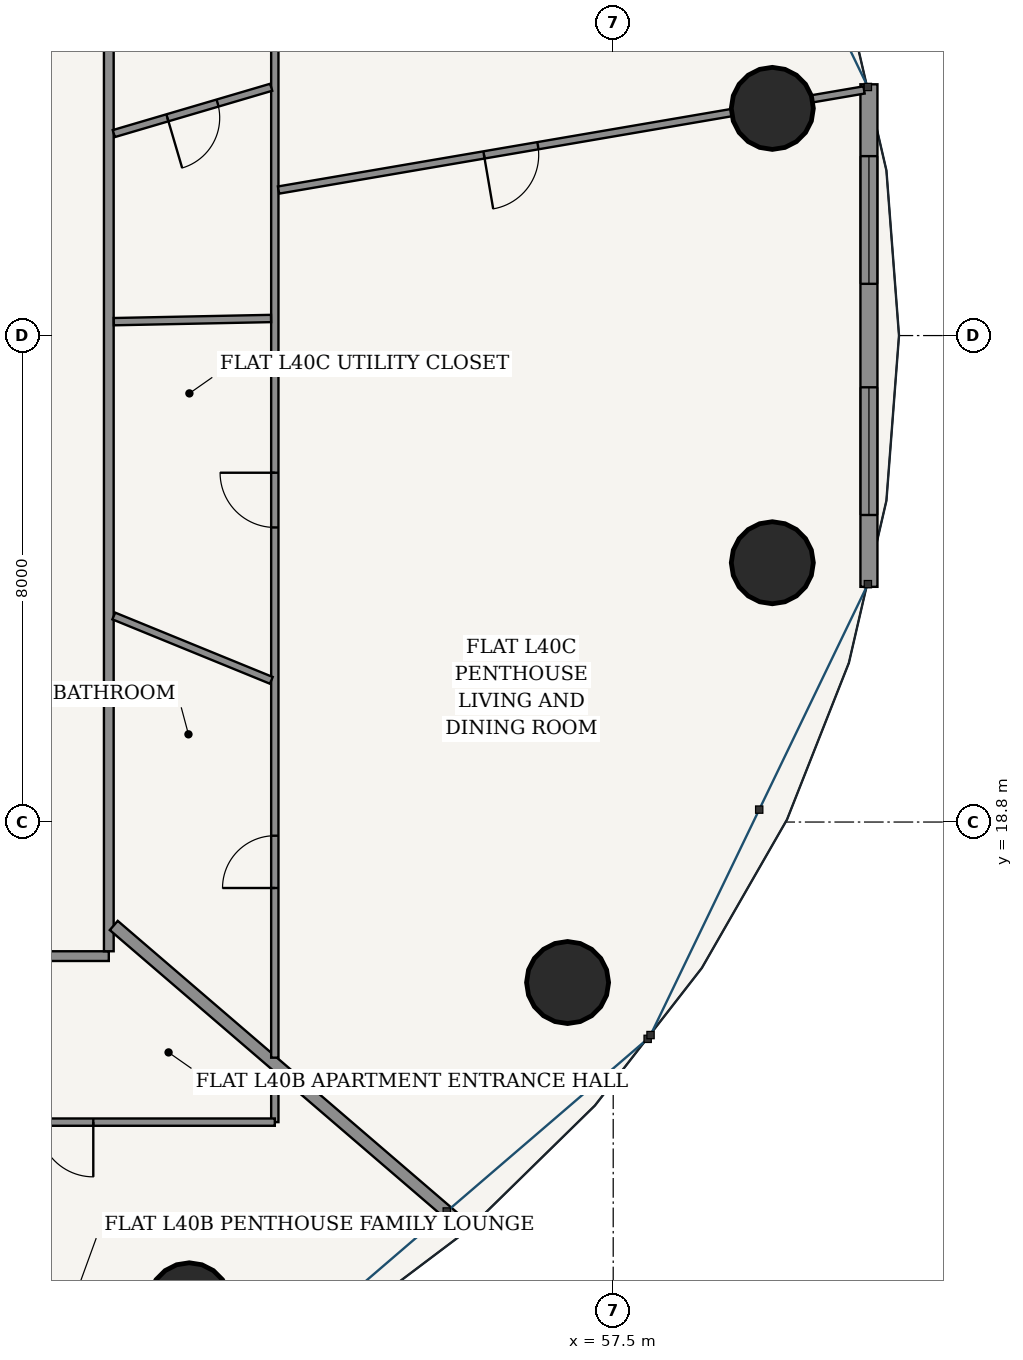
"""IFC4 building model, lengths in metres.
Left out: names, types, materials, properties, quantities, classifications, styles, units other than length and angle.
Written with IfcOpenShell. Run it as: python <this file> out.ifc"""

import sys

from ifc_helpers import new_model, si_unit, direction, frame, frame_2d, origin, origin_2d, place, context, subcontext, project, spatial, rectangle, hollow_circle, extrude, source, transform, mapped, element, fill, save


model = new_model("IFC4")
c1 = context("Model", 3, precision=1e-05, world=origin(), true_north=direction((-0.2419218956, 0.970295726276)))
c2 = subcontext(c1, "Body", "Model", "MODEL_VIEW")
j1 = project(units=[si_unit("LENGTHUNIT", "METRE"), si_unit("PLANEANGLEUNIT", "RADIAN")], contexts=[c1])
p1 = place(None, origin())
s1 = spatial("IfcSite", under=j1, at=p1, CompositionType="ELEMENT")
p2 = place(p1, origin())
s2 = spatial("IfcBuilding", under=s1, at=p2, CompositionType="ELEMENT")
p3 = place(p2, frame((0.0, 0.0, 153.4)))
s3 = spatial("IfcBuildingStorey", under=s2, at=p3, CompositionType="ELEMENT", Elevation=153.4)
for number, where, z_axis, x_axis in (
    (1, (60.117, 30.536, 0.0), (0.0, 0.0, 1.0), (1.0, 0.0, 0.0)),
    (2, (50.528, 10.877, 0.0), (0.0, 0.0, 1.0), (1.0, 0.0, 0.0)),
    (3, (56.75, 16.161, 0.0), (0.0, 0.0, 1.0), (1.0, 0.0, 0.0)),
    (4, (60.117, 23.064, 0.0), (0.0, 0.0, 1.0), (1.0, 0.0, 0.0)),
):
    element("IfcColumn", number, at=place(p3, frame(where, z_axis=z_axis, x_axis=x_axis)), inside=s3, PredefinedType="COLUMN", context=c2, shape_type="SweptSolid", body=[
        extrude(hollow_circle(Radius=0.675, WallThickness=0.042, at=origin_2d()), origin(), (0.0, 0.0, 1.0), 3.6),
    ])
p4 = place(p3, frame((61.706, 22.668, 0.0), z_axis=(0.0, 0.0, 1.0), x_axis=(0.0, 1.0, 0.0)))
e5 = element("IfcWall", 5, at=p4, inside=s3, PredefinedType="SOLIDWALL", context=c2, shape_type="SweptSolid", body=[
    extrude(rectangle(XDim=8.264, YDim=0.28, at=frame_2d((4.132, 0.0))), origin(), (0.0, 0.0, 1.0), 3.33),
])
p5 = place(p4, frame((1.181, 0.0, 0.85)))
e6 = element("IfcOpeningElement", 6, at=p5, cuts=e5, PredefinedType="OPENING", context=c2, shape_type="SweptSolid", body=[
    extrude(rectangle(XDim=2.1, YDim=1.95, at=frame_2d((1.05, 0.975))), frame((0.0, 0.15, 0.0), z_axis=(0.0, -1.0, 0.0), x_axis=(1.0, 0.0, 0.0)), (0.0, 0.0, 1.0), 0.3),
])
p6 = place(p4, frame((4.983, 0.0, 0.85)))
e7 = element("IfcOpeningElement", 7, at=p6, cuts=e5, PredefinedType="OPENING", context=c2, shape_type="SweptSolid", body=[
    extrude(rectangle(XDim=2.1, YDim=1.95, at=frame_2d((1.05, 0.975))), frame((0.0, 0.15, 0.0), z_axis=(0.0, -1.0, 0.0), x_axis=(1.0, 0.0, 0.0)), (0.0, 0.0, 1.0), 0.3),
])
p7 = place(p3, frame((34.32, 16.595, 0.0), z_axis=(0.0, 0.0, 1.0), x_axis=(1.0, 0.0, 0.0)))
e8 = element("IfcWall", 8, at=p7, inside=s3, PredefinedType="PARTITIONING", context=c2, shape_type="SweptSolid", body=[
    extrude(rectangle(XDim=14.885, YDim=0.16, at=frame_2d((7.442, 0.0))), origin(), (0.0, 0.0, 1.0), 2.776),
])
p8 = place(p7, frame((11.609, 0.0, 0.0)))
e9 = element("IfcOpeningElement", 9, at=p8, cuts=e8, PredefinedType="OPENING", context=c2, shape_type="SweptSolid", body=[
    extrude(rectangle(XDim=0.98, YDim=2.2, at=frame_2d((0.49, 1.1))), frame((0.0, 0.09, 0.0), z_axis=(0.0, -1.0, 0.0), x_axis=(1.0, 0.0, 0.0)), (0.0, 0.0, 1.0), 0.18),
])
p9 = place(p3, frame((49.205, 16.675, 0.0), z_axis=(0.0, 0.0, 1.0), x_axis=(0.0, 1.0, 0.0)))
e10 = element("IfcWall", 10, at=p9, inside=s3, PredefinedType="PARTITIONING", context=c2, shape_type="SweptSolid", body=[
    extrude(rectangle(XDim=18.4, YDim=0.16, at=frame_2d((9.2, 0.0))), origin(), (0.0, 0.0, 1.0), 2.776),
])
p10 = place(p9, frame((15.299, 0.0, 0.0)))
e11 = element("IfcOpeningElement", 11, at=p10, cuts=e10, PredefinedType="OPENING", context=c2, shape_type="SweptSolid", body=[
    extrude(rectangle(XDim=0.98, YDim=2.2, at=frame_2d((0.49, 1.1))), frame((0.0, 0.09, 0.0), z_axis=(0.0, -1.0, 0.0), x_axis=(1.0, 0.0, 0.0)), (0.0, 0.0, 1.0), 0.18),
])
p11 = place(p3, frame((51.935, 14.721, 0.0), z_axis=(0.0, 0.0, 1.0), x_axis=(0.0, -1.0, 0.0)))
e12 = element("IfcWall", 12, at=p11, inside=s3, PredefinedType="PARTITIONING", context=c2, shape_type="SweptSolid", body=[
    extrude(rectangle(XDim=0.856, YDim=0.12, at=frame_2d((0.428, 0.0))), origin(), (0.0, 0.0, 1.0), 3.33),
])
p12 = place(p3, frame((51.935, 13.865, 0.0), z_axis=(0.0, 0.0, 1.0), x_axis=(-1.0, 0.0, 0.0)))
e13 = element("IfcWall", 13, at=p12, inside=s3, PredefinedType="PARTITIONING", context=c2, shape_type="SweptSolid", body=[
    extrude(rectangle(XDim=20.345, YDim=0.12, at=frame_2d((10.172, 0.0))), origin(), (0.0, 0.0, 1.0), 2.776),
])
p13 = place(p12, frame((2.985, 0.0, 0.0)))
e14 = element("IfcOpeningElement", 14, at=p13, cuts=e13, PredefinedType="OPENING", context=c2, shape_type="SweptSolid", body=[
    extrude(rectangle(XDim=0.9, YDim=2.15, at=frame_2d((0.45, 1.075))), frame((0.0, 0.07, 0.0), z_axis=(0.0, -1.0, 0.0), x_axis=(1.0, 0.0, 0.0)), (0.0, 0.0, 1.0), 0.14),
])
p14 = place(p12, frame((12.333, 0.0, 0.0)))
e15 = element("IfcOpeningElement", 15, at=p14, cuts=e13, PredefinedType="OPENING", context=c2, shape_type="SweptSolid", body=[
    extrude(rectangle(XDim=0.9, YDim=2.15, at=frame_2d((0.45, 1.075))), frame((0.0, 0.07, 0.0), z_axis=(0.0, -1.0, 0.0), x_axis=(1.0, 0.0, 0.0)), (0.0, 0.0, 1.0), 0.14),
])
p15 = place(p12, frame((18.436, 0.0, 0.0)))
e16 = element("IfcOpeningElement", 16, at=p15, cuts=e13, PredefinedType="OPENING", context=c2, shape_type="SweptSolid", body=[
    extrude(rectangle(XDim=0.9, YDim=2.15, at=frame_2d((0.45, 1.075))), frame((0.0, 0.07, 0.0), z_axis=(0.0, -1.0, 0.0), x_axis=(1.0, 0.0, 0.0)), (0.0, 0.0, 1.0), 0.14),
])
p16 = place(p3, frame((49.287, 17.099, 0.0), z_axis=(0.0, 0.0, 1.0), x_axis=(0.758362300646, -0.651833276965, 0.0)))
e17 = element("IfcWall", 17, at=p16, inside=s3, PredefinedType="PARTITIONING", context=c2, shape_type="SweptSolid", body=[
    extrude(rectangle(XDim=7.618, YDim=0.2, at=frame_2d((3.809, 0.0))), origin(), (0.0, 0.0, 1.0), 2.846),
])
p17 = place(p3, frame((51.935, 37.885, 0.0), z_axis=(0.0, 0.0, 1.0), x_axis=(0.0, -1.0, 0.0)))
e18 = element("IfcWall", 18, at=p17, inside=s3, PredefinedType="PARTITIONING", context=c2, shape_type="SweptSolid", body=[
    extrude(rectangle(XDim=22.96, YDim=0.12, at=frame_2d((11.48, 0.0))), origin(), (0.0, 0.0, 1.0), 2.776),
])
p18 = place(p17, frame((4.61, 0.0, 0.0)))
e19 = element("IfcOpeningElement", 19, at=p18, cuts=e18, PredefinedType="OPENING", context=c2, shape_type="SweptSolid", body=[
    extrude(rectangle(XDim=0.9, YDim=2.15, at=frame_2d((0.45, 1.075))), frame((0.0, 0.07, 0.0), z_axis=(0.0, -1.0, 0.0), x_axis=(1.0, 0.0, 0.0)), (0.0, 0.0, 1.0), 0.14),
])
p19 = place(p17, frame((19.31, 0.0, 0.0)))
e20 = element("IfcOpeningElement", 20, at=p19, cuts=e18, PredefinedType="OPENING", context=c2, shape_type="SweptSolid", body=[
    extrude(rectangle(XDim=0.86, YDim=2.15, at=frame_2d((0.43, 1.075))), frame((0.0, 0.07, 0.0), z_axis=(0.0, -1.0, 0.0), x_axis=(1.0, 0.0, 0.0)), (0.0, 0.0, 1.0), 0.14),
])
p20 = place(p17, frame((13.341, 0.0, 0.0)))
e21 = element("IfcOpeningElement", 21, at=p20, cuts=e18, PredefinedType="OPENING", context=c2, shape_type="SweptSolid", body=[
    extrude(rectangle(XDim=0.9, YDim=2.15, at=frame_2d((0.45, 1.075))), frame((0.0, 0.07, 0.0), z_axis=(0.0, -1.0, 0.0), x_axis=(1.0, 0.0, 0.0)), (0.0, 0.0, 1.0), 0.14),
])
p21 = place(p3, frame((51.996, 29.193, 0.0), z_axis=(0.0, 0.0, 1.0), x_axis=(0.985698378271, 0.168519159369, 0.0)))
e22 = element("IfcWall", 22, at=p21, inside=s3, PredefinedType="PARTITIONING", context=c2, shape_type="SweptSolid", body=[
    extrude(rectangle(XDim=9.769, YDim=0.12, at=frame_2d((4.884, 0.0))), origin(), (0.0, 0.0, 1.0), 2.776),
])
p22 = place(p21, frame((3.428, 0.0, 0.0)))
e23 = element("IfcOpeningElement", 23, at=p22, cuts=e22, PredefinedType="OPENING", context=c2, shape_type="SweptSolid", body=[
    extrude(rectangle(XDim=0.9, YDim=2.15, at=frame_2d((0.45, 1.075))), frame((0.0, 0.07, 0.0), z_axis=(0.0, -1.0, 0.0), x_axis=(1.0, 0.0, 0.0)), (0.0, 0.0, 1.0), 0.14),
])
p23 = place(p3, frame((49.287, 22.188, 0.0), z_axis=(0.0, 0.0, 1.0), x_axis=(0.925708058909, -0.378238799796, 0.0)))
e24 = element("IfcWall", 24, at=p23, inside=s3, PredefinedType="PARTITIONING", context=c2, shape_type="SweptSolid", body=[
    extrude(rectangle(XDim=2.799, YDim=0.12, at=frame_2d((1.399, 0.0))), origin(), (0.0, 0.0, 1.0), 3.33),
])
p24 = place(p3, frame((49.287, 27.029, 0.0), z_axis=(0.0, 0.0, 1.0), x_axis=(0.999794052369, 0.020294157974, 0.0)))
e25 = element("IfcWall", 25, at=p24, inside=s3, PredefinedType="PARTITIONING", context=c2, shape_type="SweptSolid", body=[
    extrude(rectangle(XDim=2.586, YDim=0.12, at=frame_2d((1.293, 0.0))), origin(), (0.0, 0.0, 1.0), 3.33),
])
p25 = place(p3, frame((49.287, 30.121, 0.0), z_axis=(0.0, 0.0, 1.0), x_axis=(0.959304970846, 0.282372046969, 0.0)))
e26 = element("IfcWall", 26, at=p25, inside=s3, PredefinedType="PARTITIONING", context=c2, shape_type="SweptSolid", body=[
    extrude(rectangle(XDim=2.698, YDim=0.12, at=frame_2d((1.349, 0.0))), origin(), (0.0, 0.0, 1.0), 3.33),
])
p26 = place(p25, frame((0.919, 0.0, 0.0)))
e27 = element("IfcOpeningElement", 27, at=p26, cuts=e26, PredefinedType="OPENING", context=c2, shape_type="SweptSolid", body=[
    extrude(rectangle(XDim=0.86, YDim=2.15, at=frame_2d((0.43, 1.075))), frame((0.0, 0.07, 0.0), z_axis=(0.0, -1.0, 0.0), x_axis=(1.0, 0.0, 0.0)), (0.0, 0.0, 1.0), 0.14),
])
m1 = source(origin(), c2, "Body", "SweptSolid", [
    extrude(rectangle(XDim=2.1, YDim=1.95, at=frame_2d((1.05, 0.975))), frame((0.0, 0.03, 0.0), z_axis=(0.0, -1.0, 0.0), x_axis=(1.0, 0.0, 0.0)), (0.0, 0.0, 1.0), 0.06),
])
p27 = place(p5, origin())
e28 = element("IfcWindow", 28, at=p27, inside=s3, PartitioningType="SINGLE_PANEL", PredefinedType="WINDOW", context=c2, shape_type="MappedRepresentation", body=[
    mapped(m1, transform((0.0, 0.0, 0.0), scale=1.0)),
])
fill(e6, e28)
p28 = place(p6, origin())
e29 = element("IfcWindow", 29, at=p28, inside=s3, PartitioningType="SINGLE_PANEL", PredefinedType="WINDOW", context=c2, shape_type="MappedRepresentation", body=[
    mapped(m1, transform((0.0, 0.0, 0.0), scale=1.0)),
])
fill(e7, e29)
m2 = source(origin(), c2, "Body", "SweptSolid", [
    extrude(rectangle(XDim=0.9, YDim=2.15, at=frame_2d((0.45, 1.075))), frame((0.0, 0.025, 0.0), z_axis=(0.0, -1.0, 0.0), x_axis=(1.0, 0.0, 0.0)), (0.0, 0.0, 1.0), 0.05),
])
p29 = place(p13, origin())
e30 = element("IfcDoor", 30, at=p29, inside=s3, OperationType="SINGLE_SWING_LEFT", PredefinedType="DOOR", context=c2, shape_type="MappedRepresentation", body=[
    mapped(m2, transform((0.0, 0.0, 0.0), scale=1.0)),
])
fill(e14, e30)
m3 = source(origin(), c2, "Body", "SweptSolid", [
    extrude(rectangle(XDim=0.86, YDim=2.15, at=frame_2d((0.43, 1.075))), frame((0.0, 0.025, 0.0), z_axis=(0.0, -1.0, 0.0), x_axis=(1.0, 0.0, 0.0)), (0.0, 0.0, 1.0), 0.05),
])
p30 = place(p26, frame((0.86, 0.0, 0.0), z_axis=(0.0, 0.0, 1.0), x_axis=(-1.0, 0.0, 0.0)))
e31 = element("IfcDoor", 31, at=p30, inside=s3, OperationType="SINGLE_SWING_RIGHT", PredefinedType="DOOR", context=c2, shape_type="MappedRepresentation", body=[
    mapped(m3, transform((0.0, 0.0, 0.0), scale=1.0)),
])
fill(e27, e31)
p31 = place(p22, frame((0.9, 0.0, 0.0), z_axis=(0.0, 0.0, 1.0), x_axis=(-1.0, 0.0, 0.0)))
e32 = element("IfcDoor", 32, at=p31, inside=s3, OperationType="SINGLE_SWING_RIGHT", PredefinedType="DOOR", context=c2, shape_type="MappedRepresentation", body=[
    mapped(m2, transform((0.0, 0.0, 0.0), scale=1.0)),
])
fill(e23, e32)
p32 = place(p19, frame((0.86, 0.0, 0.0), z_axis=(0.0, 0.0, 1.0), x_axis=(-1.0, 0.0, 0.0)))
e33 = element("IfcDoor", 33, at=p32, inside=s3, OperationType="SINGLE_SWING_LEFT", PredefinedType="DOOR", context=c2, shape_type="MappedRepresentation", body=[
    mapped(m3, transform((0.0, 0.0, 0.0), scale=1.0)),
])
fill(e20, e33)
p33 = place(p20, frame((0.9, 0.0, 0.0), z_axis=(0.0, 0.0, 1.0), x_axis=(-1.0, 0.0, 0.0)))
e34 = element("IfcDoor", 34, at=p33, inside=s3, OperationType="SINGLE_SWING_RIGHT", PredefinedType="DOOR", context=c2, shape_type="MappedRepresentation", body=[
    mapped(m2, transform((0.0, 0.0, 0.0), scale=1.0)),
])
fill(e21, e34)
save(model, sys.argv[1])
